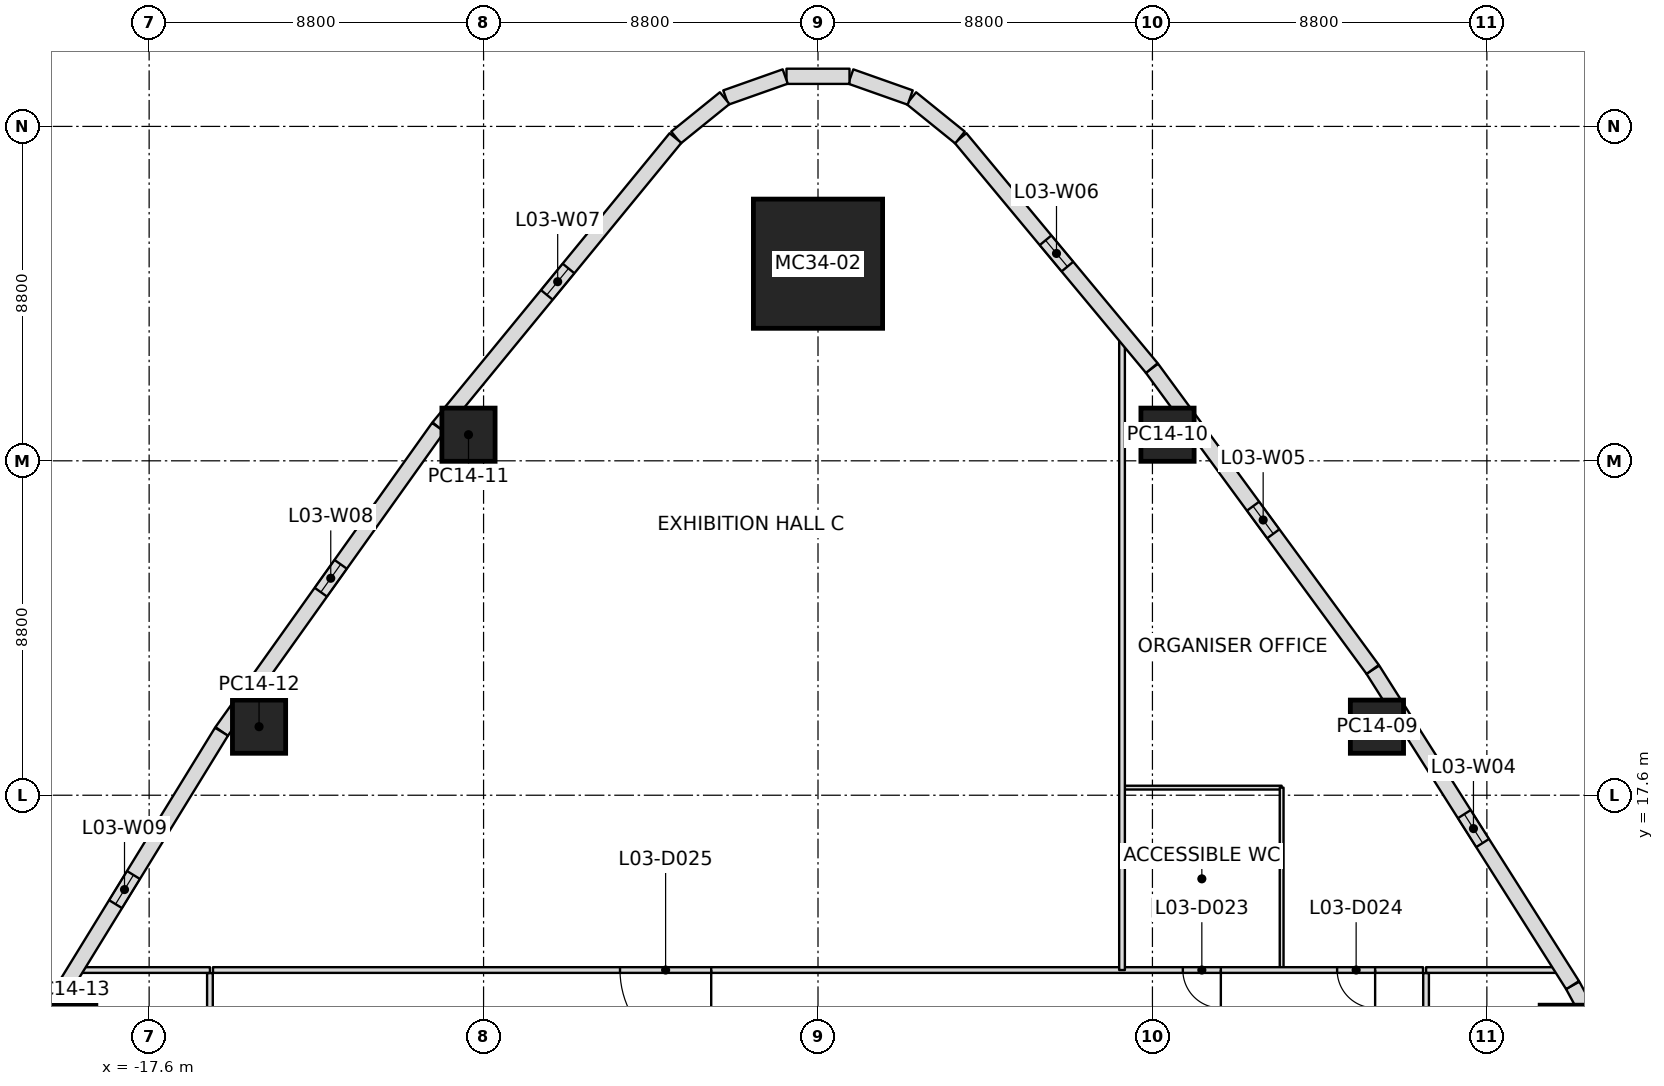
"""IFC4 building model, lengths in metres.
Left out: names, types, materials, properties, quantities, classifications, styles, units other than length and angle.
Written with IfcOpenShell. Run it as: python <this file> out.ifc"""

import sys

from ifc_helpers import new_model, si_unit, direction, frame, frame_2d, origin, origin_2d, place, context, subcontext, project, spatial, rectangle, extrude, element, fill, save


model = new_model("IFC4")
c1 = context("Model", 3, precision=1e-05, world=origin(), true_north=direction((0.0, 1.0)))
c2 = subcontext(c1, "Body", "Model", "MODEL_VIEW")
j1 = project(units=[si_unit("LENGTHUNIT", "METRE"), si_unit("PLANEANGLEUNIT", "RADIAN")], contexts=[c1])
p1 = place(None, origin())
s1 = spatial("IfcSite", under=j1, at=p1, CompositionType="ELEMENT")
p2 = place(p1, origin())
s2 = spatial("IfcBuilding", under=s1, at=p2, CompositionType="ELEMENT")
p3 = place(p2, frame((0.0, 0.0, 22.2)))
s3 = spatial("IfcBuildingStorey", under=s2, at=p3, CompositionType="ELEMENT", Elevation=22.2)
p4 = place(p3, frame((0.0, 31.587, 0.0), z_axis=(0.0, 0.0, 1.0), x_axis=(1.0, 0.0, 0.0)))
e1 = element("IfcColumn", 1, at=p4, inside=s3, PredefinedType="COLUMN", context=c2, shape_type="SweptSolid", body=[
    extrude(rectangle(XDim=3.4, YDim=3.4, at=origin_2d()), origin(), (0.0, 0.0, 1.0), 6.6),
])
for number, where, z_axis, x_axis in (
    (2, (19.702, 11.375, 0.0), (0.0, 0.0, 1.0), (-0.5, 0.866, 0.0)),
    (3, (14.708, 19.404, 0.0), (0.0, 0.0, 1.0), (-0.556, 0.831, 0.0)),
    (4, (9.197, 27.087, 0.0), (0.0, 0.0, 1.0), (-0.609, 0.793, 0.0)),
    (5, (-9.197, 27.087, 0.0), (0.0, 0.0, 1.0), (0.609, 0.793, 0.0)),
    (6, (-14.708, 19.404, 0.0), (0.0, 0.0, 1.0), (0.556, 0.831, 0.0)),
    (7, (-19.702, 11.375, 0.0), (0.0, 0.0, 1.0), (0.5, 0.866, 0.0)),
):
    element("IfcColumn", number, at=place(p3, frame(where, z_axis=z_axis, x_axis=x_axis)), inside=s3, PredefinedType="COLUMN", context=c2, shape_type="SweptSolid", body=[
        extrude(rectangle(XDim=1.4, YDim=1.4, at=origin_2d()), origin(), (0.0, 0.0, 1.0), 6.6),
    ])
p5 = place(p3, frame((19.859, 12.597, 0.0), z_axis=(0.0, 0.0, 1.0), x_axis=(0.476254331716, -0.879307575039, 0.0)))
e8 = element("IfcWall", 8, at=p5, inside=s3, PredefinedType="STANDARD", context=c2, shape_type="SweptSolid", body=[
    extrude(rectangle(XDim=9.825, YDim=0.4, at=frame_2d((4.913, 0.0))), origin(), (0.0, 0.0, 1.0), 5.7),
])
p6 = place(p5, frame((4.5, 0.0, 0.9)))
e9 = element("IfcOpeningElement", 9, at=p6, cuts=e8, PredefinedType="OPENING", context=c2, shape_type="SweptSolid", body=[
    extrude(rectangle(XDim=0.9, YDim=3.3, at=frame_2d((0.45, 1.65))), frame((0.0, 0.2, 0.0), z_axis=(0.0, -1.0, 0.0), x_axis=(1.0, 0.0, 0.0)), (0.0, 0.0, 1.0), 0.4),
])
p7 = place(p3, frame((14.599, 20.905, 0.0), z_axis=(0.0, 0.0, 1.0), x_axis=(0.534912566476, -0.844907418731, 0.0)))
e10 = element("IfcWall", 10, at=p7, inside=s3, PredefinedType="STANDARD", context=c2, shape_type="SweptSolid", body=[
    extrude(rectangle(XDim=9.826, YDim=0.4, at=frame_2d((4.913, 0.0))), origin(), (0.0, 0.0, 1.0), 5.7),
])
p8 = place(p7, frame((4.5, 0.0, 0.9)))
e11 = element("IfcOpeningElement", 11, at=p8, cuts=e10, PredefinedType="OPENING", context=c2, shape_type="SweptSolid", body=[
    extrude(rectangle(XDim=0.9, YDim=3.3, at=frame_2d((0.45, 1.65))), frame((0.0, 0.2, 0.0), z_axis=(0.0, -1.0, 0.0), x_axis=(1.0, 0.0, 0.0)), (0.0, 0.0, 1.0), 0.4),
])
p9 = place(p3, frame((8.788, 28.836, 0.0), z_axis=(0.0, 0.0, 1.0), x_axis=(0.591085715329, -0.806608750966, 0.0)))
e12 = element("IfcWall", 12, at=p9, inside=s3, PredefinedType="STANDARD", context=c2, shape_type="SweptSolid", body=[
    extrude(rectangle(XDim=9.826, YDim=0.4, at=frame_2d((4.913, 0.0))), origin(), (0.0, 0.0, 1.0), 5.7),
])
p10 = place(p9, frame((4.5, 0.0, 0.9)))
e13 = element("IfcOpeningElement", 13, at=p10, cuts=e12, PredefinedType="OPENING", context=c2, shape_type="SweptSolid", body=[
    extrude(rectangle(XDim=0.9, YDim=3.3, at=frame_2d((0.45, 1.65))), frame((0.0, 0.2, 0.0), z_axis=(0.0, -1.0, 0.0), x_axis=(1.0, 0.0, 0.0)), (0.0, 0.0, 1.0), 0.4),
])
p11 = place(p3, frame((3.75, 34.894, 0.0), z_axis=(0.0, 0.0, 1.0), x_axis=(0.639357483443, -0.768909623015, 0.0)))
e14 = element("IfcWall", 14, at=p11, inside=s3, PredefinedType="STANDARD", context=c2, shape_type="SweptSolid", body=[
    extrude(rectangle(XDim=7.874, YDim=0.4, at=frame_2d((3.937, 0.0))), origin(), (0.0, 0.0, 1.0), 5.7),
])
p12 = place(p11, frame((3.5, 0.0, 0.9)))
e15 = element("IfcOpeningElement", 15, at=p12, cuts=e14, PredefinedType="OPENING", context=c2, shape_type="SweptSolid", body=[
    extrude(rectangle(XDim=0.9, YDim=3.3, at=frame_2d((0.45, 1.65))), frame((0.0, 0.2, 0.0), z_axis=(0.0, -1.0, 0.0), x_axis=(1.0, 0.0, 0.0)), (0.0, 0.0, 1.0), 0.4),
])
p13 = place(p3, frame((2.456, 35.943, 0.0), z_axis=(0.0, 0.0, 1.0), x_axis=(0.77769018818, -0.628647732207, 0.0)))
e16 = element("IfcWall", 16, at=p13, inside=s3, PredefinedType="STANDARD", context=c2, shape_type="SweptSolid", body=[
    extrude(rectangle(XDim=1.646, YDim=0.4, at=frame_2d((0.823, 0.0))), origin(), (0.0, 0.0, 1.0), 5.7),
])
for number, where, z_axis, x_axis in (
    (17, (0.863, 36.513, 0.0), (0.0, 0.0, 1.0), (0.943, -0.333, 0.0)),
    (18, (-0.829, 36.519, 0.0), (0.0, 0.0, 1.0), (1.0, 0.0, 0.0)),
    (19, (-2.427, 35.96, 0.0), (0.0, 0.0, 1.0), (0.943, 0.333, 0.0)),
):
    element("IfcWall", number, at=place(p3, frame(where, z_axis=z_axis, x_axis=x_axis)), inside=s3, PredefinedType="STANDARD", context=c2, shape_type="SweptSolid", body=[
        extrude(rectangle(XDim=1.659, YDim=0.4, at=frame_2d((0.829, 0.0))), origin(), (0.0, 0.0, 1.0), 5.7),
    ])
p14 = place(p3, frame((-3.736, 34.908, 0.0), z_axis=(0.0, 0.0, 1.0), x_axis=(0.77769018818, 0.628647732207, 0.0)))
e20 = element("IfcWall", 20, at=p14, inside=s3, PredefinedType="STANDARD", context=c2, shape_type="SweptSolid", body=[
    extrude(rectangle(XDim=1.646, YDim=0.4, at=frame_2d((0.823, 0.0))), origin(), (0.0, 0.0, 1.0), 5.7),
])
p15 = place(p3, frame((-9.989, 27.287, 0.0), z_axis=(0.0, 0.0, 1.0), x_axis=(0.634103626557, 0.773248078424, 0.0)))
e21 = element("IfcWall", 21, at=p15, inside=s3, PredefinedType="STANDARD", context=c2, shape_type="SweptSolid", body=[
    extrude(rectangle(XDim=9.838, YDim=0.4, at=frame_2d((4.919, 0.0))), origin(), (0.0, 0.0, 1.0), 5.7),
])
p16 = place(p15, frame((4.5, 0.0, 0.9)))
e22 = element("IfcOpeningElement", 22, at=p16, cuts=e21, PredefinedType="OPENING", context=c2, shape_type="SweptSolid", body=[
    extrude(rectangle(XDim=0.9, YDim=3.3, at=frame_2d((0.45, 1.65))), frame((0.0, 0.2, 0.0), z_axis=(0.0, -1.0, 0.0), x_axis=(1.0, 0.0, 0.0)), (0.0, 0.0, 1.0), 0.4),
])
p17 = place(p3, frame((-15.692, 19.278, 0.0), z_axis=(0.0, 0.0, 1.0), x_axis=(0.580062373049, 0.814572061498, 0.0)))
e23 = element("IfcWall", 23, at=p17, inside=s3, PredefinedType="STANDARD", context=c2, shape_type="SweptSolid", body=[
    extrude(rectangle(XDim=9.826, YDim=0.4, at=frame_2d((4.913, 0.0))), origin(), (0.0, 0.0, 1.0), 5.7),
])
p18 = place(p17, frame((4.5, 0.0, 0.9)))
e24 = element("IfcOpeningElement", 24, at=p18, cuts=e23, PredefinedType="OPENING", context=c2, shape_type="SweptSolid", body=[
    extrude(rectangle(XDim=0.9, YDim=3.3, at=frame_2d((0.45, 1.65))), frame((0.0, 0.2, 0.0), z_axis=(0.0, -1.0, 0.0), x_axis=(1.0, 0.0, 0.0)), (0.0, 0.0, 1.0), 0.4),
])
p19 = place(p3, frame((-20.839, 10.9, 0.0), z_axis=(0.0, 0.0, 1.0), x_axis=(0.523369396098, 0.85210590611, 0.0)))
e25 = element("IfcWall", 25, at=p19, inside=s3, PredefinedType="STANDARD", context=c2, shape_type="SweptSolid", body=[
    extrude(rectangle(XDim=9.825, YDim=0.4, at=frame_2d((4.913, 0.0))), origin(), (0.0, 0.0, 1.0), 5.7),
])
p20 = place(p19, frame((4.5, 0.0, 0.9)))
e26 = element("IfcOpeningElement", 26, at=p20, cuts=e25, PredefinedType="OPENING", context=c2, shape_type="SweptSolid", body=[
    extrude(rectangle(XDim=0.9, YDim=3.3, at=frame_2d((0.45, 1.65))), frame((0.0, 0.2, 0.0), z_axis=(0.0, -1.0, 0.0), x_axis=(1.0, 0.0, 0.0)), (0.0, 0.0, 1.0), 0.4),
])
p21 = place(p3, frame((-16.0, 13.0, 0.0), z_axis=(0.0, 0.0, 1.0), x_axis=(-1.0, 0.0, 0.0)))
e27 = element("IfcWall", 27, at=p21, inside=s3, PredefinedType="PARTITIONING", context=c2, shape_type="SweptSolid", body=[
    extrude(rectangle(XDim=3.479, YDim=0.15, at=frame_2d((1.74, 0.0))), origin(), (0.0, 0.0, 1.0), 5.734),
])
p22 = place(p3, frame((8.0, 13.0, 0.0), z_axis=(0.0, 0.0, 1.0), x_axis=(0.0, 1.0, 0.0)))
e28 = element("IfcWall", 28, at=p22, inside=s3, PredefinedType="PARTITIONING", context=c2, shape_type="SweptSolid", body=[
    extrude(rectangle(XDim=16.631, YDim=0.15, at=frame_2d((8.315, 0.0))), origin(), (0.0, 0.0, 1.0), 5.734),
])
p23 = place(p3, frame((19.479, 13.0, 0.0), z_axis=(0.0, 0.0, 1.0), x_axis=(-1.0, 0.0, 0.0)))
e29 = element("IfcWall", 29, at=p23, inside=s3, PredefinedType="PARTITIONING", context=c2, shape_type="SweptSolid", body=[
    extrude(rectangle(XDim=3.479, YDim=0.15, at=frame_2d((1.74, 0.0))), origin(), (0.0, 0.0, 1.0), 5.734),
])
p24 = place(p3, frame((-16.0, 12.92, 0.0), z_axis=(0.0, 0.0, 1.0), x_axis=(0.0, -1.0, 0.0)))
e30 = element("IfcWall", 30, at=p24, inside=s3, PredefinedType="PARTITIONING", context=c2, shape_type="SweptSolid", body=[
    extrude(rectangle(XDim=25.84, YDim=0.15, at=frame_2d((12.92, 0.0))), origin(), (0.0, 0.0, 1.0), 5.447),
])
p25 = place(p24, frame((11.73, 0.0, 0.0)))
e31 = element("IfcOpeningElement", 31, at=p25, cuts=e30, PredefinedType="OPENING", context=c2, shape_type="SweptSolid", body=[
    extrude(rectangle(XDim=2.4, YDim=2.1, at=frame_2d((1.2, 1.05))), frame((0.0, 0.075, 0.0), z_axis=(0.0, -1.0, 0.0), x_axis=(1.0, 0.0, 0.0)), (0.0, 0.0, 1.0), 0.15),
])
p26 = place(p3, frame((15.92, 13.0, 0.0), z_axis=(0.0, 0.0, 1.0), x_axis=(-1.0, 0.0, 0.0)))
e32 = element("IfcWall", 32, at=p26, inside=s3, PredefinedType="PARTITIONING", context=c2, shape_type="SweptSolid", body=[
    extrude(rectangle(XDim=31.84, YDim=0.15, at=frame_2d((15.92, 0.0))), origin(), (0.0, 0.0, 1.0), 5.447),
])
p27 = place(p26, frame((5.32, 0.0, 0.0)))
e33 = element("IfcOpeningElement", 33, at=p27, cuts=e32, PredefinedType="OPENING", context=c2, shape_type="SweptSolid", body=[
    extrude(rectangle(XDim=1.0, YDim=2.1, at=frame_2d((0.5, 1.05))), frame((0.0, 0.075, 0.0), z_axis=(0.0, -1.0, 0.0), x_axis=(1.0, 0.0, 0.0)), (0.0, 0.0, 1.0), 0.15),
])
p28 = place(p26, frame((1.26, 0.0, 0.0)))
e34 = element("IfcOpeningElement", 34, at=p28, cuts=e32, PredefinedType="OPENING", context=c2, shape_type="SweptSolid", body=[
    extrude(rectangle(XDim=1.0, YDim=2.1, at=frame_2d((0.5, 1.05))), frame((0.0, 0.075, 0.0), z_axis=(0.0, -1.0, 0.0), x_axis=(1.0, 0.0, 0.0)), (0.0, 0.0, 1.0), 0.15),
])
p29 = place(p26, frame((18.73, 0.0, 0.0)))
e35 = element("IfcOpeningElement", 35, at=p29, cuts=e32, PredefinedType="OPENING", context=c2, shape_type="SweptSolid", body=[
    extrude(rectangle(XDim=2.4, YDim=2.1, at=frame_2d((1.2, 1.05))), frame((0.0, 0.075, 0.0), z_axis=(0.0, -1.0, 0.0), x_axis=(1.0, 0.0, 0.0)), (0.0, 0.0, 1.0), 0.15),
])
p30 = place(p3, frame((16.0, -12.92, 0.0), z_axis=(0.0, 0.0, 1.0), x_axis=(0.0, 1.0, 0.0)))
e36 = element("IfcWall", 36, at=p30, inside=s3, PredefinedType="PARTITIONING", context=c2, shape_type="SweptSolid", body=[
    extrude(rectangle(XDim=25.84, YDim=0.15, at=frame_2d((12.92, 0.0))), origin(), (0.0, 0.0, 1.0), 5.447),
])
p31 = place(p30, frame((0.41, 0.0, 0.0)))
e37 = element("IfcOpeningElement", 37, at=p31, cuts=e36, PredefinedType="OPENING", context=c2, shape_type="SweptSolid", body=[
    extrude(rectangle(XDim=1.0, YDim=2.1, at=frame_2d((0.5, 1.05))), frame((0.0, 0.075, 0.0), z_axis=(0.0, -1.0, 0.0), x_axis=(1.0, 0.0, 0.0)), (0.0, 0.0, 1.0), 0.15),
])
p32 = place(p30, frame((12.72, 0.0, 0.0)))
e38 = element("IfcOpeningElement", 38, at=p32, cuts=e36, PredefinedType="OPENING", context=c2, shape_type="SweptSolid", body=[
    extrude(rectangle(XDim=2.4, YDim=2.1, at=frame_2d((1.2, 1.05))), frame((0.0, 0.075, 0.0), z_axis=(0.0, -1.0, 0.0), x_axis=(1.0, 0.0, 0.0)), (0.0, 0.0, 1.0), 0.15),
])
p33 = place(p3, frame((8.03, 17.8, 0.0), z_axis=(0.0, 0.0, 1.0), x_axis=(1.0, 0.0, 0.0)))
e39 = element("IfcWall", 39, at=p33, inside=s3, PredefinedType="PARTITIONING", context=c2, shape_type="SweptSolid", body=[
    extrude(rectangle(XDim=4.17, YDim=0.1, at=frame_2d((2.085, 0.0))), origin(), (0.0, 0.0, 1.0), 5.95),
])
p34 = place(p3, frame((12.2, 17.8, 0.0), z_axis=(0.0, 0.0, 1.0), x_axis=(0.0, -1.0, 0.0)))
e40 = element("IfcWall", 40, at=p34, inside=s3, PredefinedType="PARTITIONING", context=c2, shape_type="SweptSolid", body=[
    extrude(rectangle(XDim=4.77, YDim=0.1, at=frame_2d((2.385, 0.0))), origin(), (0.0, 0.0, 1.0), 5.747),
])
p35 = place(p8, origin())
e41 = element("IfcWindow", 41, at=p35, inside=s3, PartitioningType="SINGLE_PANEL", PredefinedType="WINDOW", context=c2, shape_type="SweptSolid", body=[
    extrude(rectangle(XDim=0.9, YDim=3.3, at=frame_2d((0.45, 1.65))), frame((0.0, 0.03, 0.0), z_axis=(0.0, -1.0, 0.0), x_axis=(1.0, 0.0, 0.0)), (0.0, 0.0, 1.0), 0.06),
])
fill(e11, e41)
p36 = place(p10, origin())
e42 = element("IfcWindow", 42, at=p36, inside=s3, PartitioningType="SINGLE_PANEL", PredefinedType="WINDOW", context=c2, shape_type="SweptSolid", body=[
    extrude(rectangle(XDim=0.9, YDim=3.3, at=frame_2d((0.45, 1.65))), frame((0.0, 0.03, 0.0), z_axis=(0.0, -1.0, 0.0), x_axis=(1.0, 0.0, 0.0)), (0.0, 0.0, 1.0), 0.06),
])
fill(e13, e42)
p37 = place(p12, origin())
e43 = element("IfcWindow", 43, at=p37, inside=s3, PartitioningType="SINGLE_PANEL", PredefinedType="WINDOW", context=c2, shape_type="SweptSolid", body=[
    extrude(rectangle(XDim=0.9, YDim=3.3, at=frame_2d((0.45, 1.65))), frame((0.0, 0.03, 0.0), z_axis=(0.0, -1.0, 0.0), x_axis=(1.0, 0.0, 0.0)), (0.0, 0.0, 1.0), 0.06),
])
fill(e15, e43)
p38 = place(p16, origin())
e44 = element("IfcWindow", 44, at=p38, inside=s3, PartitioningType="SINGLE_PANEL", PredefinedType="WINDOW", context=c2, shape_type="SweptSolid", body=[
    extrude(rectangle(XDim=0.9, YDim=3.3, at=frame_2d((0.45, 1.65))), frame((0.0, 0.03, 0.0), z_axis=(0.0, -1.0, 0.0), x_axis=(1.0, 0.0, 0.0)), (0.0, 0.0, 1.0), 0.06),
])
fill(e22, e44)
p39 = place(p18, origin())
e45 = element("IfcWindow", 45, at=p39, inside=s3, PartitioningType="SINGLE_PANEL", PredefinedType="WINDOW", context=c2, shape_type="SweptSolid", body=[
    extrude(rectangle(XDim=0.9, YDim=3.3, at=frame_2d((0.45, 1.65))), frame((0.0, 0.03, 0.0), z_axis=(0.0, -1.0, 0.0), x_axis=(1.0, 0.0, 0.0)), (0.0, 0.0, 1.0), 0.06),
])
fill(e24, e45)
p40 = place(p20, origin())
e46 = element("IfcWindow", 46, at=p40, inside=s3, PartitioningType="SINGLE_PANEL", PredefinedType="WINDOW", context=c2, shape_type="SweptSolid", body=[
    extrude(rectangle(XDim=0.9, YDim=3.3, at=frame_2d((0.45, 1.65))), frame((0.0, 0.03, 0.0), z_axis=(0.0, -1.0, 0.0), x_axis=(1.0, 0.0, 0.0)), (0.0, 0.0, 1.0), 0.06),
])
fill(e26, e46)
p41 = place(p27, origin())
e47 = element("IfcDoor", 47, at=p41, inside=s3, OperationType="SINGLE_SWING_LEFT", PredefinedType="DOOR", context=c2, shape_type="SweptSolid", body=[
    extrude(rectangle(XDim=1.0, YDim=2.1, at=frame_2d((0.5, 1.05))), frame((0.0, 0.025, 0.0), z_axis=(0.0, -1.0, 0.0), x_axis=(1.0, 0.0, 0.0)), (0.0, 0.0, 1.0), 0.05),
])
fill(e33, e47)
p42 = place(p28, origin())
e48 = element("IfcDoor", 48, at=p42, inside=s3, OperationType="SINGLE_SWING_LEFT", PredefinedType="DOOR", context=c2, shape_type="SweptSolid", body=[
    extrude(rectangle(XDim=1.0, YDim=2.1, at=frame_2d((0.5, 1.05))), frame((0.0, 0.025, 0.0), z_axis=(0.0, -1.0, 0.0), x_axis=(1.0, 0.0, 0.0)), (0.0, 0.0, 1.0), 0.05),
])
fill(e34, e48)
p43 = place(p29, origin())
e49 = element("IfcDoor", 49, at=p43, inside=s3, OperationType="DOUBLE_DOOR_SINGLE_SWING", PredefinedType="DOOR", context=c2, shape_type="SweptSolid", body=[
    extrude(rectangle(XDim=2.4, YDim=2.1, at=frame_2d((1.2, 1.05))), frame((0.0, 0.025, 0.0), z_axis=(0.0, -1.0, 0.0), x_axis=(1.0, 0.0, 0.0)), (0.0, 0.0, 1.0), 0.05),
])
fill(e35, e49)
save(model, sys.argv[1])
